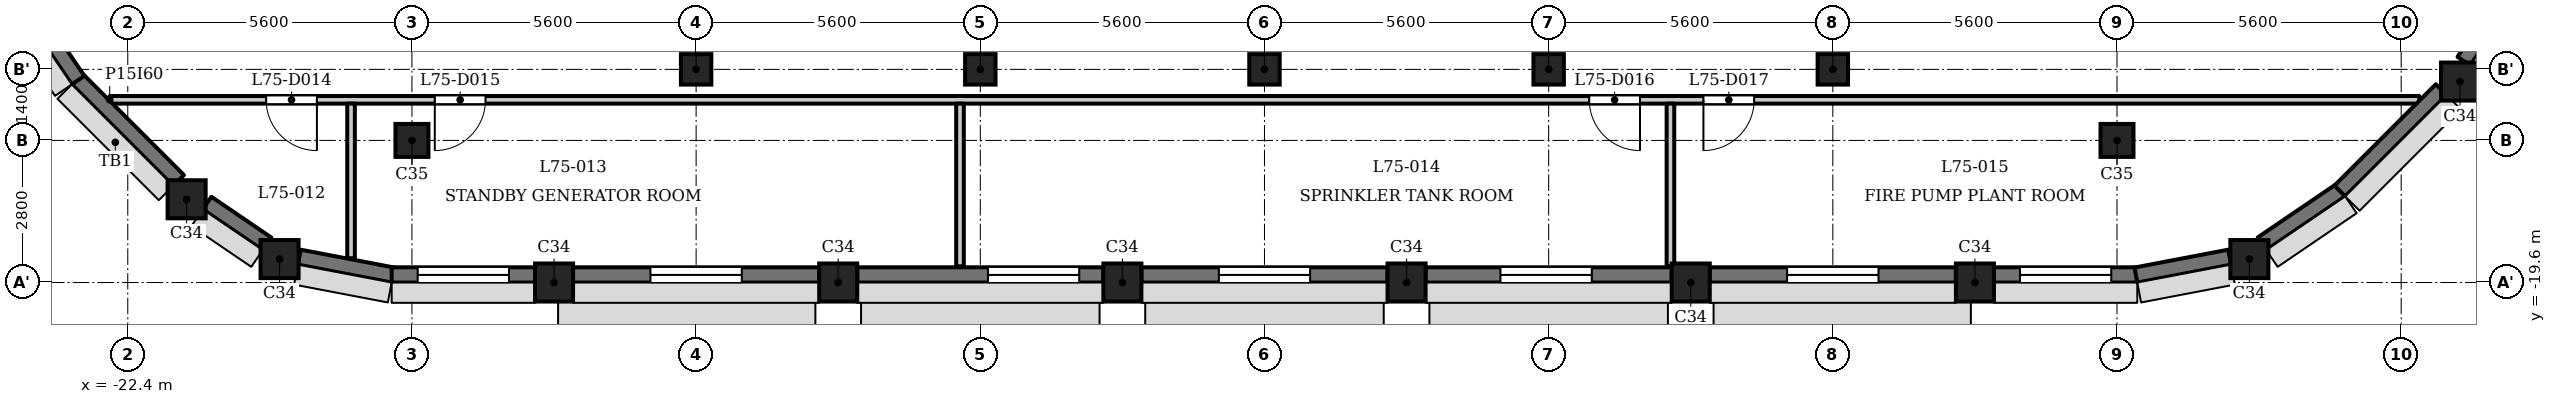
"""IFC4 building model, lengths in metres.
Left out: names, types, materials, properties, quantities, classifications, styles, units other than length and angle.
Written with IfcOpenShell. Run it as: python <this file> out.ifc"""

import sys

from ifc_helpers import new_model, si_unit, direction, frame, frame_2d, origin, origin_2d, place, context, subcontext, project, spatial, rectangle, extrude, element, fill, save


model = new_model("IFC4")
c1 = context("Model", 3, precision=1e-05, world=origin(), true_north=direction((0.0, 1.0)))
c2 = subcontext(c1, "Body", "Model", "MODEL_VIEW")
j1 = project(units=[si_unit("LENGTHUNIT", "METRE"), si_unit("PLANEANGLEUNIT", "RADIAN")], contexts=[c1])
p1 = place(None, origin())
s1 = spatial("IfcSite", under=j1, at=p1, CompositionType="ELEMENT")
p2 = place(p1, origin())
s2 = spatial("IfcBuilding", under=s1, at=p2, CompositionType="ELEMENT")
p3 = place(p2, frame((0.0, 0.0, 289.1)))
s3 = spatial("IfcBuildingStorey", under=s2, at=p3, CompositionType="ELEMENT", Elevation=289.1)
for number, where, z_axis, x_axis in (
    (1, (-19.409, -19.138, 0.0), (0.0, 0.0, 1.0), (1.0, 0.0, 0.0)),
    (2, (-14.0, -19.6, 0.0), (0.0, 0.0, 1.0), (1.0, 0.0, 0.0)),
    (3, (-8.4, -19.6, 0.0), (0.0, 0.0, 1.0), (1.0, 0.0, 0.0)),
    (4, (-2.8, -19.6, 0.0), (0.0, 0.0, 1.0), (1.0, 0.0, 0.0)),
    (5, (2.8, -19.6, 0.0), (0.0, 0.0, 1.0), (1.0, 0.0, 0.0)),
    (6, (8.4, -19.6, 0.0), (0.0, 0.0, 1.0), (1.0, 0.0, 0.0)),
    (7, (14.0, -19.6, 0.0), (0.0, 0.0, 1.0), (1.0, 0.0, 0.0)),
    (8, (19.409, -19.138, 0.0), (0.0, 0.0, 1.0), (1.0, 0.0, 0.0)),
    (9, (23.56, -15.64, 0.0), (0.0, 0.0, 1.0), (1.0, 0.0, 0.0)),
    (10, (-21.24, -17.96, 0.0), (0.0, 0.0, 1.0), (1.0, 0.0, 0.0)),
):
    element("IfcColumn", number, at=place(p3, frame(where, z_axis=z_axis, x_axis=x_axis)), inside=s3, PredefinedType="COLUMN", context=c2, shape_type="SweptSolid", body=[
        extrude(rectangle(XDim=0.75, YDim=0.75, at=origin_2d()), origin(), (0.0, 0.0, 1.0), 5.4),
    ])
for number, where, z_axis, x_axis in (
    (11, (-16.8, -16.8, 0.0), (0.0, 0.0, 1.0), (1.0, 0.0, 0.0)),
    (12, (16.8, -16.8, 0.0), (0.0, 0.0, 1.0), (1.0, 0.0, 0.0)),
):
    element("IfcColumn", number, at=place(p3, frame(where, z_axis=z_axis, x_axis=x_axis)), inside=s3, PredefinedType="COLUMN", context=c2, shape_type="SweptSolid", body=[
        extrude(rectangle(XDim=0.65, YDim=0.65, at=origin_2d()), origin(), (0.0, 0.0, 1.0), 5.4),
    ])
for number, where, z_axis, x_axis in (
    (13, (-11.2, -15.4, 0.0), (0.0, 0.0, 1.0), (1.0, 0.0, 0.0)),
    (14, (-5.6, -15.4, 0.0), (0.0, 0.0, 1.0), (1.0, 0.0, 0.0)),
    (15, (0.0, -15.4, 0.0), (0.0, 0.0, 1.0), (1.0, 0.0, 0.0)),
    (16, (5.6, -15.4, 0.0), (0.0, 0.0, 1.0), (1.0, 0.0, 0.0)),
    (17, (11.2, -15.4, 0.0), (0.0, 0.0, 1.0), (1.0, 0.0, 0.0)),
):
    element("IfcColumn", number, at=place(p3, frame(where, z_axis=z_axis, x_axis=x_axis)), inside=s3, PredefinedType="COLUMN", context=c2, shape_type="SweptSolid", body=[
        extrude(rectangle(XDim=0.6, YDim=0.6, at=origin_2d()), origin(), (0.0, 0.0, 1.0), 5.4),
    ])
p4 = place(p3, frame((-23.397, -15.591, 0.0), z_axis=(0.0, 0.0, 1.0), x_axis=(0.707106781187, -0.707106781187, 0.0)))
e18 = element("IfcWall", 18, at=p4, inside=s3, PredefinedType="SOLIDWALL", context=c2, shape_type="SweptSolid", body=[
    extrude(rectangle(XDim=2.825, YDim=0.3, at=frame_2d((1.413, 0.0))), origin(), (0.0, 0.0, 1.0), 3.2),
])
p5 = place(p3, frame((-20.837, -18.034, 0.0), z_axis=(0.0, 0.0, 1.0), x_axis=(0.827095130818, -0.562061957952, 0.0)))
e19 = element("IfcWall", 19, at=p5, inside=s3, PredefinedType="SOLIDWALL", context=c2, shape_type="SweptSolid", body=[
    extrude(rectangle(XDim=1.427, YDim=0.3, at=frame_2d((0.713, 0.0))), origin(), (0.0, 0.0, 1.0), 3.2),
])
p6 = place(p3, frame((-19.02, -19.1, 0.0), z_axis=(0.0, 0.0, 1.0), x_axis=(0.982284001233, -0.187398348234, 0.0)))
e20 = element("IfcWall", 20, at=p6, inside=s3, PredefinedType="SOLIDWALL", context=c2, shape_type="SweptSolid", body=[
    extrude(rectangle(XDim=1.881, YDim=0.3, at=frame_2d((0.941, 0.0))), origin(), (0.0, 0.0, 1.0), 3.2),
])
p7 = place(p3, frame((-17.2, -19.45, 0.0), z_axis=(0.0, 0.0, 1.0), x_axis=(1.0, 0.0, 0.0)))
e21 = element("IfcWall", 21, at=p7, inside=s3, PredefinedType="SOLIDWALL", context=c2, shape_type="SweptSolid", body=[
    extrude(rectangle(XDim=2.825, YDim=0.3, at=frame_2d((1.413, 0.0))), origin(), (0.0, 0.0, 1.0), 3.2),
])
p8 = place(p7, frame((0.512, 0.0, 0.9)))
e22 = element("IfcOpeningElement", 22, at=p8, cuts=e21, PredefinedType="OPENING", context=c2, shape_type="SweptSolid", body=[
    extrude(rectangle(XDim=1.8, YDim=1.5, at=frame_2d((0.9, 0.75))), frame((0.0, 0.16, 0.0), z_axis=(0.0, -1.0, 0.0), x_axis=(1.0, 0.0, 0.0)), (0.0, 0.0, 1.0), 0.32),
])
p9 = place(p3, frame((-13.625, -19.45, 0.0), z_axis=(0.0, 0.0, 1.0), x_axis=(1.0, 0.0, 0.0)))
e23 = element("IfcWall", 23, at=p9, inside=s3, PredefinedType="SOLIDWALL", context=c2, shape_type="SweptSolid", body=[
    extrude(rectangle(XDim=4.85, YDim=0.3, at=frame_2d((2.425, 0.0))), origin(), (0.0, 0.0, 1.0), 3.2),
])
p10 = place(p9, frame((1.525, 0.0, 0.9)))
e24 = element("IfcOpeningElement", 24, at=p10, cuts=e23, PredefinedType="OPENING", context=c2, shape_type="SweptSolid", body=[
    extrude(rectangle(XDim=1.8, YDim=1.5, at=frame_2d((0.9, 0.75))), frame((0.0, 0.16, 0.0), z_axis=(0.0, -1.0, 0.0), x_axis=(1.0, 0.0, 0.0)), (0.0, 0.0, 1.0), 0.32),
])
p11 = place(p3, frame((-8.025, -19.45, 0.0), z_axis=(0.0, 0.0, 1.0), x_axis=(1.0, 0.0, 0.0)))
e25 = element("IfcWall", 25, at=p11, inside=s3, PredefinedType="SOLIDWALL", context=c2, shape_type="SweptSolid", body=[
    extrude(rectangle(XDim=4.85, YDim=0.3, at=frame_2d((2.425, 0.0))), origin(), (0.0, 0.0, 1.0), 3.2),
])
p12 = place(p11, frame((2.575, 0.0, 0.9)))
e26 = element("IfcOpeningElement", 26, at=p12, cuts=e25, PredefinedType="OPENING", context=c2, shape_type="SweptSolid", body=[
    extrude(rectangle(XDim=1.8, YDim=1.5, at=frame_2d((0.9, 0.75))), frame((0.0, 0.16, 0.0), z_axis=(0.0, -1.0, 0.0), x_axis=(1.0, 0.0, 0.0)), (0.0, 0.0, 1.0), 0.32),
])
p13 = place(p3, frame((-2.425, -19.45, 0.0), z_axis=(0.0, 0.0, 1.0), x_axis=(1.0, 0.0, 0.0)))
e27 = element("IfcWall", 27, at=p13, inside=s3, PredefinedType="SOLIDWALL", context=c2, shape_type="SweptSolid", body=[
    extrude(rectangle(XDim=4.85, YDim=0.3, at=frame_2d((2.425, 0.0))), origin(), (0.0, 0.0, 1.0), 3.2),
])
p14 = place(p13, frame((1.525, 0.0, 0.9)))
e28 = element("IfcOpeningElement", 28, at=p14, cuts=e27, PredefinedType="OPENING", context=c2, shape_type="SweptSolid", body=[
    extrude(rectangle(XDim=1.8, YDim=1.5, at=frame_2d((0.9, 0.75))), frame((0.0, 0.16, 0.0), z_axis=(0.0, -1.0, 0.0), x_axis=(1.0, 0.0, 0.0)), (0.0, 0.0, 1.0), 0.32),
])
p15 = place(p3, frame((3.175, -19.45, 0.0), z_axis=(0.0, 0.0, 1.0), x_axis=(1.0, 0.0, 0.0)))
e29 = element("IfcWall", 29, at=p15, inside=s3, PredefinedType="SOLIDWALL", context=c2, shape_type="SweptSolid", body=[
    extrude(rectangle(XDim=4.85, YDim=0.3, at=frame_2d((2.425, 0.0))), origin(), (0.0, 0.0, 1.0), 3.2),
])
p16 = place(p15, frame((1.475, 0.0, 0.9)))
e30 = element("IfcOpeningElement", 30, at=p16, cuts=e29, PredefinedType="OPENING", context=c2, shape_type="SweptSolid", body=[
    extrude(rectangle(XDim=1.8, YDim=1.5, at=frame_2d((0.9, 0.75))), frame((0.0, 0.16, 0.0), z_axis=(0.0, -1.0, 0.0), x_axis=(1.0, 0.0, 0.0)), (0.0, 0.0, 1.0), 0.32),
])
p17 = place(p3, frame((8.775, -19.45, 0.0), z_axis=(0.0, 0.0, 1.0), x_axis=(1.0, 0.0, 0.0)))
e31 = element("IfcWall", 31, at=p17, inside=s3, PredefinedType="SOLIDWALL", context=c2, shape_type="SweptSolid", body=[
    extrude(rectangle(XDim=4.85, YDim=0.3, at=frame_2d((2.425, 0.0))), origin(), (0.0, 0.0, 1.0), 3.2),
])
p18 = place(p17, frame((1.525, 0.0, 0.9)))
e32 = element("IfcOpeningElement", 32, at=p18, cuts=e31, PredefinedType="OPENING", context=c2, shape_type="SweptSolid", body=[
    extrude(rectangle(XDim=1.8, YDim=1.5, at=frame_2d((0.9, 0.75))), frame((0.0, 0.16, 0.0), z_axis=(0.0, -1.0, 0.0), x_axis=(1.0, 0.0, 0.0)), (0.0, 0.0, 1.0), 0.32),
])
p19 = place(p3, frame((14.375, -19.45, 0.0), z_axis=(0.0, 0.0, 1.0), x_axis=(1.0, 0.0, 0.0)))
e33 = element("IfcWall", 33, at=p19, inside=s3, PredefinedType="SOLIDWALL", context=c2, shape_type="SweptSolid", body=[
    extrude(rectangle(XDim=2.825, YDim=0.3, at=frame_2d((1.413, 0.0))), origin(), (0.0, 0.0, 1.0), 3.2),
])
p20 = place(p19, frame((0.512, 0.0, 0.9)))
e34 = element("IfcOpeningElement", 34, at=p20, cuts=e33, PredefinedType="OPENING", context=c2, shape_type="SweptSolid", body=[
    extrude(rectangle(XDim=1.8, YDim=1.5, at=frame_2d((0.9, 0.75))), frame((0.0, 0.16, 0.0), z_axis=(0.0, -1.0, 0.0), x_axis=(1.0, 0.0, 0.0)), (0.0, 0.0, 1.0), 0.32),
])
p21 = place(p3, frame((17.172, -19.453, 0.0), z_axis=(0.0, 0.0, 1.0), x_axis=(0.982284001233, 0.187398348234, 0.0)))
e35 = element("IfcWall", 35, at=p21, inside=s3, PredefinedType="SOLIDWALL", context=c2, shape_type="SweptSolid", body=[
    extrude(rectangle(XDim=1.881, YDim=0.3, at=frame_2d((0.941, 0.0))), origin(), (0.0, 0.0, 1.0), 3.2),
])
p22 = place(p3, frame((19.657, -18.836, 0.0), z_axis=(0.0, 0.0, 1.0), x_axis=(0.82704477487, 0.562136051469, 0.0)))
e36 = element("IfcWall", 36, at=p22, inside=s3, PredefinedType="SOLIDWALL", context=c2, shape_type="SweptSolid", body=[
    extrude(rectangle(XDim=1.881, YDim=0.3, at=frame_2d((0.94, 0.0))), origin(), (0.0, 0.0, 1.0), 3.2),
])
p23 = place(p3, frame((21.191, -17.797, 0.0), z_axis=(0.0, 0.0, 1.0), x_axis=(0.707106781187, 0.707106781187, 0.0)))
e37 = element("IfcWall", 37, at=p23, inside=s3, PredefinedType="SOLIDWALL", context=c2, shape_type="SweptSolid", body=[
    extrude(rectangle(XDim=2.825, YDim=0.3, at=frame_2d((1.413, 0.0))), origin(), (0.0, 0.0, 1.0), 3.2),
])
p24 = place(p3, frame((23.634, -15.237, 0.0), z_axis=(0.0, 0.0, 1.0), x_axis=(0.562099454787, 0.827069648173, 0.0)))
e38 = element("IfcWall", 38, at=p24, inside=s3, PredefinedType="SOLIDWALL", context=c2, shape_type="SweptSolid", body=[
    extrude(rectangle(XDim=1.427, YDim=0.3, at=frame_2d((0.714, 0.0))), origin(), (0.0, 0.0, 1.0), 3.2),
])
p25 = place(p3, frame((-24.436, -14.057, 0.0), z_axis=(0.0, 0.0, 1.0), x_axis=(0.562075713892, -0.827085782645, 0.0)))
e39 = element("IfcWall", 39, at=p25, inside=s3, PredefinedType="SOLIDWALL", context=c2, shape_type="SweptSolid", body=[
    extrude(rectangle(XDim=1.881, YDim=0.3, at=frame_2d((0.94, 0.0))), origin(), (0.0, 0.0, 1.0), 3.2),
])
p26 = place(p3, frame((-22.756, -16.0, 0.0), z_axis=(0.0, 0.0, 1.0), x_axis=(1.0, 0.0, 0.0)))
e40 = element("IfcWall", 40, at=p26, inside=s3, PredefinedType="PARTITIONING", context=c2, shape_type="SweptSolid", body=[
    extrude(rectangle(XDim=45.511, YDim=0.15, at=frame_2d((22.756, 0.0))), origin(), (0.0, 0.0, 1.0), 5.0),
])
p27 = place(p26, frame((3.083, 0.0, 0.0)))
e41 = element("IfcOpeningElement", 41, at=p27, cuts=e40, PredefinedType="OPENING", context=c2, shape_type="SweptSolid", body=[
    extrude(rectangle(XDim=1.0, YDim=2.1, at=frame_2d((0.5, 1.05))), frame((0.0, 0.085, 0.0), z_axis=(0.0, -1.0, 0.0), x_axis=(1.0, 0.0, 0.0)), (0.0, 0.0, 1.0), 0.17),
])
p28 = place(p26, frame((6.406, 0.0, 0.0)))
e42 = element("IfcOpeningElement", 42, at=p28, cuts=e40, PredefinedType="OPENING", context=c2, shape_type="SweptSolid", body=[
    extrude(rectangle(XDim=1.0, YDim=2.1, at=frame_2d((0.5, 1.05))), frame((0.0, 0.085, 0.0), z_axis=(0.0, -1.0, 0.0), x_axis=(1.0, 0.0, 0.0)), (0.0, 0.0, 1.0), 0.17),
])
p29 = place(p26, frame((29.156, 0.0, 0.0)))
e43 = element("IfcOpeningElement", 43, at=p29, cuts=e40, PredefinedType="OPENING", context=c2, shape_type="SweptSolid", body=[
    extrude(rectangle(XDim=1.0, YDim=2.1, at=frame_2d((0.5, 1.05))), frame((0.0, 0.085, 0.0), z_axis=(0.0, -1.0, 0.0), x_axis=(1.0, 0.0, 0.0)), (0.0, 0.0, 1.0), 0.17),
])
p30 = place(p26, frame((31.406, 0.0, 0.0)))
e44 = element("IfcOpeningElement", 44, at=p30, cuts=e40, PredefinedType="OPENING", context=c2, shape_type="SweptSolid", body=[
    extrude(rectangle(XDim=1.0, YDim=2.1, at=frame_2d((0.5, 1.05))), frame((0.0, 0.085, 0.0), z_axis=(0.0, -1.0, 0.0), x_axis=(1.0, 0.0, 0.0)), (0.0, 0.0, 1.0), 0.17),
])
p31 = place(p3, frame((-18.0, -19.122, 0.0), z_axis=(0.0, 0.0, 1.0), x_axis=(0.0, 1.0, 0.0)))
e45 = element("IfcWall", 45, at=p31, inside=s3, PredefinedType="PARTITIONING", context=c2, shape_type="SweptSolid", body=[
    extrude(rectangle(XDim=3.047, YDim=0.15, at=frame_2d((1.523, 0.0))), origin(), (0.0, 0.0, 1.0), 5.0),
])
for number, where, z_axis, x_axis in (
    (46, (-6.0, -19.28, 0.0), (0.0, 0.0, 1.0), (0.0, 1.0, 0.0)),
    (47, (8.0, -19.28, 0.0), (0.0, 0.0, 1.0), (0.0, 1.0, 0.0)),
):
    element("IfcWall", number, at=place(p3, frame(where, z_axis=z_axis, x_axis=x_axis)), inside=s3, PredefinedType="PARTITIONING", context=c2, shape_type="SweptSolid", body=[
        extrude(rectangle(XDim=3.205, YDim=0.15, at=frame_2d((1.603, 0.0))), origin(), (0.0, 0.0, 1.0), 5.0),
    ])
p32 = place(p27, origin())
e48 = element("IfcDoor", 48, at=p32, inside=s3, OperationType="SINGLE_SWING_RIGHT", PredefinedType="DOOR", context=c2, shape_type="SweptSolid", body=[
    extrude(rectangle(XDim=1.0, YDim=2.1, at=frame_2d((0.5, 1.05))), frame((0.0, 0.025, 0.0), z_axis=(0.0, -1.0, 0.0), x_axis=(1.0, 0.0, 0.0)), (0.0, 0.0, 1.0), 0.05),
])
fill(e41, e48)
p33 = place(p28, origin())
e49 = element("IfcDoor", 49, at=p33, inside=s3, OperationType="SINGLE_SWING_LEFT", PredefinedType="DOOR", context=c2, shape_type="SweptSolid", body=[
    extrude(rectangle(XDim=1.0, YDim=2.1, at=frame_2d((0.5, 1.05))), frame((0.0, 0.025, 0.0), z_axis=(0.0, -1.0, 0.0), x_axis=(1.0, 0.0, 0.0)), (0.0, 0.0, 1.0), 0.05),
])
fill(e42, e49)
p34 = place(p29, origin())
e50 = element("IfcDoor", 50, at=p34, inside=s3, OperationType="SINGLE_SWING_RIGHT", PredefinedType="DOOR", context=c2, shape_type="SweptSolid", body=[
    extrude(rectangle(XDim=1.0, YDim=2.1, at=frame_2d((0.5, 1.05))), frame((0.0, 0.025, 0.0), z_axis=(0.0, -1.0, 0.0), x_axis=(1.0, 0.0, 0.0)), (0.0, 0.0, 1.0), 0.05),
])
fill(e43, e50)
p35 = place(p30, origin())
e51 = element("IfcDoor", 51, at=p35, inside=s3, OperationType="SINGLE_SWING_LEFT", PredefinedType="DOOR", context=c2, shape_type="SweptSolid", body=[
    extrude(rectangle(XDim=1.0, YDim=2.1, at=frame_2d((0.5, 1.05))), frame((0.0, 0.025, 0.0), z_axis=(0.0, -1.0, 0.0), x_axis=(1.0, 0.0, 0.0)), (0.0, 0.0, 1.0), 0.05),
])
fill(e44, e51)
p36 = place(p8, origin())
e52 = element("IfcWindow", 52, at=p36, inside=s3, PartitioningType="SINGLE_PANEL", PredefinedType="WINDOW", context=c2, shape_type="SweptSolid", body=[
    extrude(rectangle(XDim=1.8, YDim=1.5, at=frame_2d((0.9, 0.75))), frame((0.0, 0.03, 0.0), z_axis=(0.0, -1.0, 0.0), x_axis=(1.0, 0.0, 0.0)), (0.0, 0.0, 1.0), 0.06),
])
fill(e22, e52)
p37 = place(p10, origin())
e53 = element("IfcWindow", 53, at=p37, inside=s3, PartitioningType="SINGLE_PANEL", PredefinedType="WINDOW", context=c2, shape_type="SweptSolid", body=[
    extrude(rectangle(XDim=1.8, YDim=1.5, at=frame_2d((0.9, 0.75))), frame((0.0, 0.03, 0.0), z_axis=(0.0, -1.0, 0.0), x_axis=(1.0, 0.0, 0.0)), (0.0, 0.0, 1.0), 0.06),
])
fill(e24, e53)
p38 = place(p12, origin())
e54 = element("IfcWindow", 54, at=p38, inside=s3, PartitioningType="SINGLE_PANEL", PredefinedType="WINDOW", context=c2, shape_type="SweptSolid", body=[
    extrude(rectangle(XDim=1.8, YDim=1.5, at=frame_2d((0.9, 0.75))), frame((0.0, 0.03, 0.0), z_axis=(0.0, -1.0, 0.0), x_axis=(1.0, 0.0, 0.0)), (0.0, 0.0, 1.0), 0.06),
])
fill(e26, e54)
p39 = place(p14, origin())
e55 = element("IfcWindow", 55, at=p39, inside=s3, PartitioningType="SINGLE_PANEL", PredefinedType="WINDOW", context=c2, shape_type="SweptSolid", body=[
    extrude(rectangle(XDim=1.8, YDim=1.5, at=frame_2d((0.9, 0.75))), frame((0.0, 0.03, 0.0), z_axis=(0.0, -1.0, 0.0), x_axis=(1.0, 0.0, 0.0)), (0.0, 0.0, 1.0), 0.06),
])
fill(e28, e55)
p40 = place(p16, origin())
e56 = element("IfcWindow", 56, at=p40, inside=s3, PartitioningType="SINGLE_PANEL", PredefinedType="WINDOW", context=c2, shape_type="SweptSolid", body=[
    extrude(rectangle(XDim=1.8, YDim=1.5, at=frame_2d((0.9, 0.75))), frame((0.0, 0.03, 0.0), z_axis=(0.0, -1.0, 0.0), x_axis=(1.0, 0.0, 0.0)), (0.0, 0.0, 1.0), 0.06),
])
fill(e30, e56)
p41 = place(p18, origin())
e57 = element("IfcWindow", 57, at=p41, inside=s3, PartitioningType="SINGLE_PANEL", PredefinedType="WINDOW", context=c2, shape_type="SweptSolid", body=[
    extrude(rectangle(XDim=1.8, YDim=1.5, at=frame_2d((0.9, 0.75))), frame((0.0, 0.03, 0.0), z_axis=(0.0, -1.0, 0.0), x_axis=(1.0, 0.0, 0.0)), (0.0, 0.0, 1.0), 0.06),
])
fill(e32, e57)
p42 = place(p20, origin())
e58 = element("IfcWindow", 58, at=p42, inside=s3, PartitioningType="SINGLE_PANEL", PredefinedType="WINDOW", context=c2, shape_type="SweptSolid", body=[
    extrude(rectangle(XDim=1.8, YDim=1.5, at=frame_2d((0.9, 0.75))), frame((0.0, 0.03, 0.0), z_axis=(0.0, -1.0, 0.0), x_axis=(1.0, 0.0, 0.0)), (0.0, 0.0, 1.0), 0.06),
])
fill(e34, e58)
save(model, sys.argv[1])
